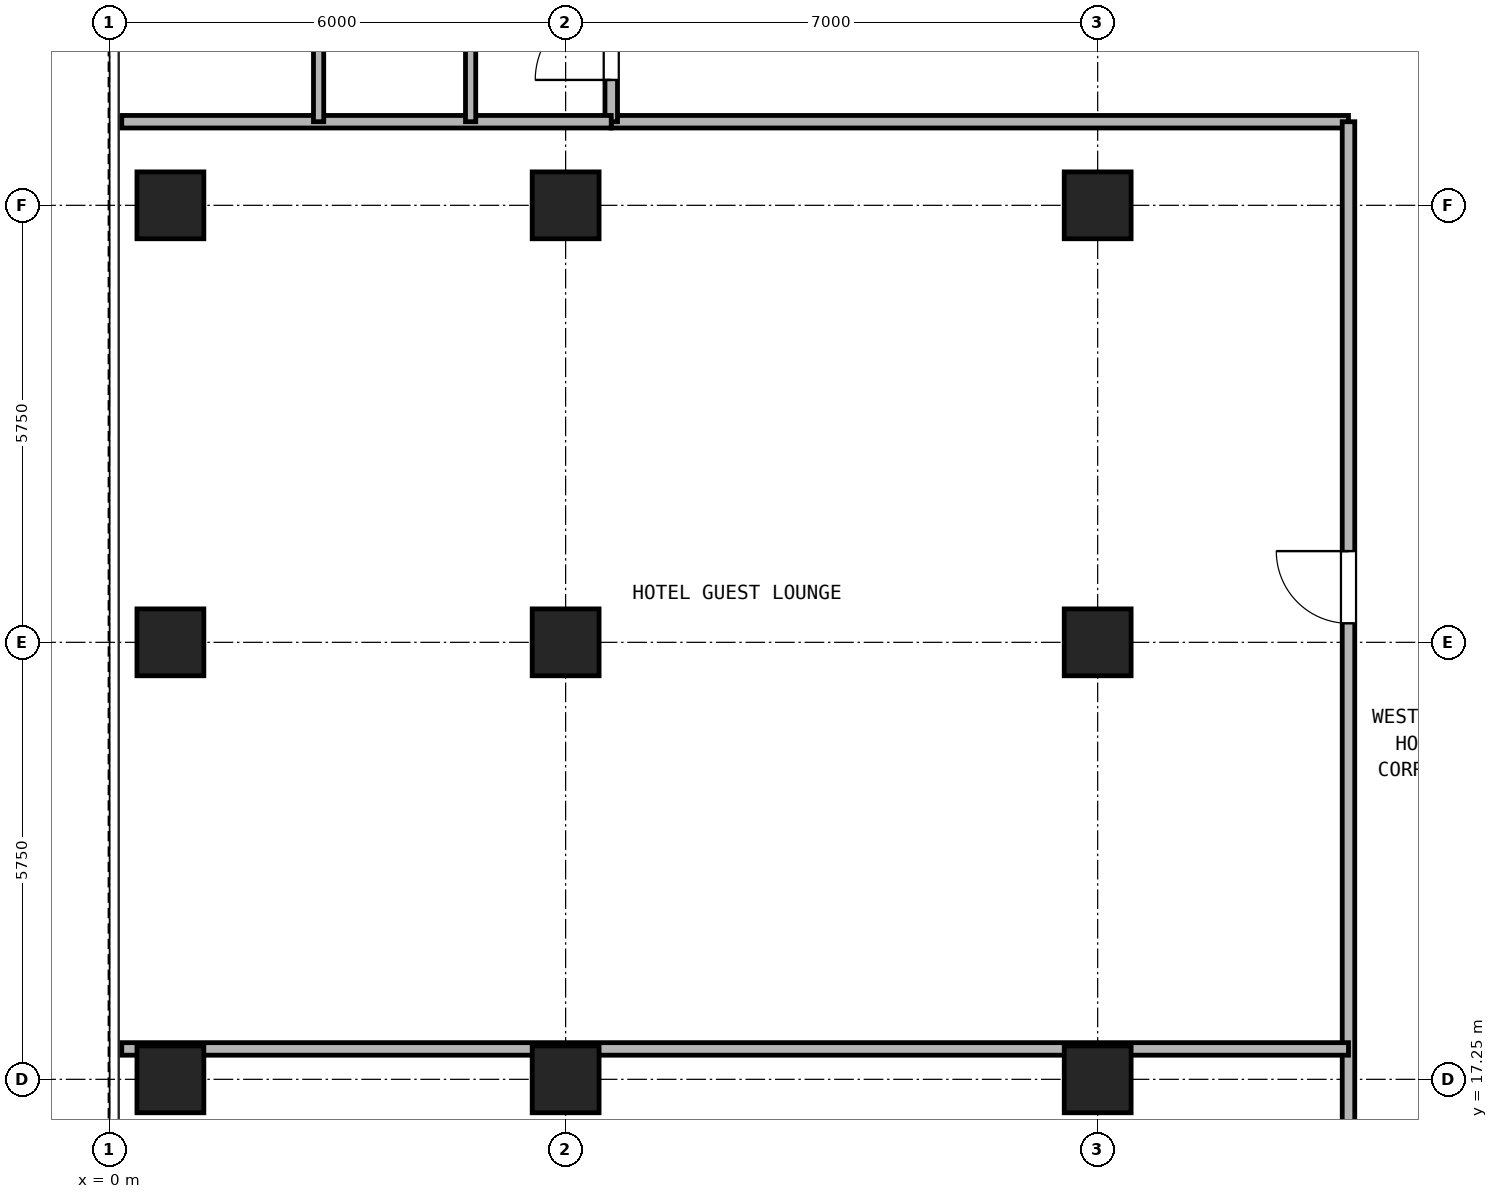
"""IFC4 building model, lengths in metres.
Left out: names, types, materials, properties, quantities, classifications, styles, units other than length and angle.
Written with IfcOpenShell. Run it as: python <this file> out.ifc"""

import sys

from ifc_helpers import new_model, si_unit, direction, frame, frame_2d, origin, origin_2d, place, context, subcontext, project, spatial, rectangle, hollow_rectangle, extrude, source, transform, mapped, element, fill, save


model = new_model("IFC4")
c1 = context("Model", 3, precision=1e-05, world=origin(), true_north=direction((0.0, 1.0)))
c2 = subcontext(c1, "Body", "Model", "MODEL_VIEW")
j1 = project(units=[si_unit("LENGTHUNIT", "METRE"), si_unit("PLANEANGLEUNIT", "RADIAN")], contexts=[c1])
p1 = place(None, origin())
s1 = spatial("IfcSite", under=j1, at=p1, CompositionType="ELEMENT")
p2 = place(p1, origin())
s2 = spatial("IfcBuilding", under=s1, at=p2, CompositionType="ELEMENT")
p3 = place(p2, frame((0.0, 0.0, 131.1)))
s3 = spatial("IfcBuildingStorey", under=s2, at=p3, CompositionType="ELEMENT", Elevation=131.1)
m1 = source(origin(), c2, "Body", "SweptSolid", [
    extrude(hollow_rectangle(XDim=0.88, YDim=0.88, WallThickness=0.05, at=origin_2d()), origin(), (0.0, 0.0, 1.0), 2.95),
])
for number, where, z_axis, x_axis in (
    (1, (0.8, 17.25, 0.0), (0.0, 0.0, 1.0), (1.0, 0.0, 0.0)),
    (2, (0.8, 23.0, 0.0), (0.0, 0.0, 1.0), (1.0, 0.0, 0.0)),
    (3, (0.8, 28.75, 0.0), (0.0, 0.0, 1.0), (1.0, 0.0, 0.0)),
    (4, (6.0, 17.25, 0.0), (0.0, 0.0, 1.0), (1.0, 0.0, 0.0)),
    (5, (6.0, 23.0, 0.0), (0.0, 0.0, 1.0), (1.0, 0.0, 0.0)),
    (6, (6.0, 28.75, 0.0), (0.0, 0.0, 1.0), (1.0, 0.0, 0.0)),
    (7, (13.0, 17.25, 0.0), (0.0, 0.0, 1.0), (1.0, 0.0, 0.0)),
    (8, (13.0, 23.0, 0.0), (0.0, 0.0, 1.0), (1.0, 0.0, 0.0)),
    (9, (13.0, 28.75, 0.0), (0.0, 0.0, 1.0), (1.0, 0.0, 0.0)),
):
    element("IfcColumn", number, at=place(p3, frame(where, z_axis=z_axis, x_axis=x_axis)), inside=s3, PredefinedType="COLUMN", context=c2, shape_type="MappedRepresentation", body=[
        mapped(m1, transform((0.0, 0.0, 0.0), x_axis=(1.0, 0.0, 0.0), y_axis=(0.0, 1.0, 0.0), z_axis=(0.0, 0.0, 1.0), scale=1.0)),
    ])
p4 = place(p3, frame((6.6, 29.85, 0.0), z_axis=(0.0, 0.0, 1.0), x_axis=(1.0, 0.0, 0.0)))
e10 = element("IfcWall", 10, at=p4, inside=s3, PredefinedType="PARTITIONING", context=c2, shape_type="SweptSolid", body=[
    extrude(rectangle(XDim=9.7, YDim=0.165, at=frame_2d((4.85, 0.0))), origin(), (0.0, 0.0, 1.0), 2.95),
])
p5 = place(p3, frame((16.3, 11.15, 0.0), z_axis=(0.0, 0.0, 1.0), x_axis=(0.0, 1.0, 0.0)))
e11 = element("IfcWall", 11, at=p5, inside=s3, PredefinedType="PARTITIONING", context=c2, shape_type="SweptSolid", body=[
    extrude(rectangle(XDim=18.7, YDim=0.165, at=frame_2d((9.35, 0.0))), origin(), (0.0, 0.0, 1.0), 2.95),
])
p6 = place(p5, frame((2.75, 0.0, 0.0)))
e12 = element("IfcOpeningElement", 12, at=p6, cuts=e11, PredefinedType="OPENING", context=c2, shape_type="SweptSolid", body=[
    extrude(rectangle(XDim=0.95, YDim=2.15, at=frame_2d((0.475, 1.075))), frame((0.0, 0.093, 0.0), z_axis=(0.0, -1.0, 0.0), x_axis=(1.0, 0.0, 0.0)), (0.0, 0.0, 1.0), 0.185),
])
p7 = place(p5, frame((12.1, 0.0, 0.0)))
e13 = element("IfcOpeningElement", 13, at=p7, cuts=e11, PredefinedType="OPENING", context=c2, shape_type="SweptSolid", body=[
    extrude(rectangle(XDim=0.95, YDim=2.15, at=frame_2d((0.475, 1.075))), frame((0.0, 0.093, 0.0), z_axis=(0.0, -1.0, 0.0), x_axis=(1.0, 0.0, 0.0)), (0.0, 0.0, 1.0), 0.185),
])
p8 = place(p3, frame((6.6, 29.85, 0.0), z_axis=(0.0, 0.0, 1.0), x_axis=(0.0, 1.0, 0.0)))
e14 = element("IfcWall", 14, at=p8, inside=s3, PredefinedType="PARTITIONING", context=c2, shape_type="SweptSolid", body=[
    extrude(rectangle(XDim=5.29, YDim=0.165, at=frame_2d((2.645, 0.0))), origin(), (0.0, 0.0, 1.0), 2.95),
])
p9 = place(p8, frame((0.55, 0.0, 0.0)))
e15 = element("IfcOpeningElement", 15, at=p9, cuts=e14, PredefinedType="OPENING", context=c2, shape_type="SweptSolid", body=[
    extrude(rectangle(XDim=1.0, YDim=2.15, at=frame_2d((0.5, 1.075))), frame((0.0, 0.093, 0.0), z_axis=(0.0, -1.0, 0.0), x_axis=(1.0, 0.0, 0.0)), (0.0, 0.0, 1.0), 0.185),
])
p10 = place(p3, frame((0.16, 29.85, 0.0), z_axis=(0.0, 0.0, 1.0), x_axis=(1.0, 0.0, 0.0)))
e16 = element("IfcWall", 16, at=p10, inside=s3, PredefinedType="PARTITIONING", context=c2, shape_type="SweptSolid", body=[
    extrude(rectangle(XDim=6.44, YDim=0.165, at=frame_2d((3.22, 0.0))), origin(), (0.0, 0.0, 1.0), 2.95),
])
for number, where, z_axis, x_axis in (
    (17, (2.75, 29.85, 0.0), (0.0, 0.0, 1.0), (0.0, 1.0, 0.0)),
    (18, (4.75, 29.85, 0.0), (0.0, 0.0, 1.0), (0.0, 1.0, 0.0)),
):
    element("IfcWall", number, at=place(p3, frame(where, z_axis=z_axis, x_axis=x_axis)), inside=s3, PredefinedType="PARTITIONING", context=c2, shape_type="SweptSolid", body=[
        extrude(rectangle(XDim=2.1, YDim=0.135, at=frame_2d((1.05, 0.0))), origin(), (0.0, 0.0, 1.0), 2.95),
    ])
p11 = place(p3, frame((0.16, 17.65, 0.0), z_axis=(0.0, 0.0, 1.0), x_axis=(1.0, 0.0, 0.0)))
e19 = element("IfcWall", 19, at=p11, inside=s3, PredefinedType="PARTITIONING", context=c2, shape_type="SweptSolid", body=[
    extrude(rectangle(XDim=16.14, YDim=0.165, at=frame_2d((8.07, 0.0))), origin(), (0.0, 0.0, 1.0), 2.95),
])
p12 = place(p9, origin())
e20 = element("IfcDoor", 20, at=p12, inside=s3, OperationType="SINGLE_SWING_LEFT", PredefinedType="DOOR", context=c2, shape_type="SweptSolid", body=[
    extrude(rectangle(XDim=1.0, YDim=2.15, at=frame_2d((0.5, 1.075))), frame((0.0, 0.025, 0.0), z_axis=(0.0, -1.0, 0.0), x_axis=(1.0, 0.0, 0.0)), (0.0, 0.0, 1.0), 0.05),
])
fill(e15, e20)
p13 = place(p7, frame((0.95, 0.0, 0.0), z_axis=(0.0, 0.0, 1.0), x_axis=(-1.0, 0.0, 0.0)))
e21 = element("IfcDoor", 21, at=p13, inside=s3, OperationType="SINGLE_SWING_RIGHT", PredefinedType="DOOR", context=c2, shape_type="SweptSolid", body=[
    extrude(rectangle(XDim=0.95, YDim=2.15, at=frame_2d((0.475, 1.075))), frame((0.0, 0.025, 0.0), z_axis=(0.0, -1.0, 0.0), x_axis=(1.0, 0.0, 0.0)), (0.0, 0.0, 1.0), 0.05),
])
fill(e13, e21)
save(model, sys.argv[1])
